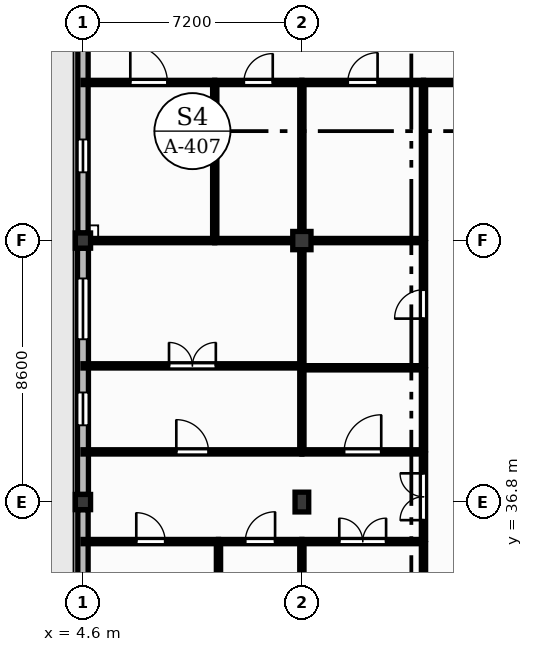
"""IFC4 building model, lengths in metres.
Left out: names, types, materials, properties, quantities, classifications, styles, units other than length and angle.
Written with IfcOpenShell. Run it as: python <this file> out.ifc"""

import sys

from ifc_helpers import new_model, si_unit, direction, frame, frame_2d, origin, origin_2d, place, context, subcontext, project, spatial, rectangle, extrude, element, fill, save


model = new_model("IFC4")
c1 = context("Model", 3, precision=1e-05, world=origin(), true_north=direction((0.0, 1.0)))
c2 = subcontext(c1, "Body", "Model", "MODEL_VIEW")
j1 = project(units=[si_unit("LENGTHUNIT", "METRE"), si_unit("PLANEANGLEUNIT", "RADIAN")], contexts=[c1])
p1 = place(None, origin())
s1 = spatial("IfcSite", under=j1, at=p1, CompositionType="ELEMENT")
p2 = place(p1, origin())
s2 = spatial("IfcBuilding", under=s1, at=p2, CompositionType="ELEMENT")
p3 = place(p2, origin())
s3 = spatial("IfcBuildingStorey", under=s2, at=p3, CompositionType="ELEMENT", Elevation=0.0)
for number, where, z_axis, x_axis in (
    (1, (4.6, 36.8, 0.0), (0.0, 0.0, 1.0), (1.0, 0.0, 0.0)),
    (2, (4.6, 45.4, 0.0), (0.0, 0.0, 1.0), (1.0, 0.0, 0.0)),
):
    element("IfcColumn", number, at=place(p3, frame(where, z_axis=z_axis, x_axis=x_axis)), inside=s3, PredefinedType="COLUMN", context=c2, shape_type="SweptSolid", body=[
        extrude(rectangle(XDim=0.5, YDim=0.5, at=origin_2d()), origin(), (0.0, 0.0, 1.0), 4.2),
    ])
p4 = place(p3, frame((11.8, 36.8, 0.0), z_axis=(0.0, 0.0, 1.0), x_axis=(1.0, 0.0, 0.0)))
e3 = element("IfcColumn", 3, at=p4, inside=s3, PredefinedType="COLUMN", context=c2, shape_type="SweptSolid", body=[
    extrude(rectangle(XDim=0.45, YDim=0.65, at=origin_2d()), origin(), (0.0, 0.0, 1.0), 4.2),
])
p5 = place(p3, frame((11.8, 45.4, 0.0), z_axis=(0.0, 0.0, 1.0), x_axis=(1.0, 0.0, 0.0)))
e4 = element("IfcColumn", 4, at=p5, inside=s3, PredefinedType="COLUMN", context=c2, shape_type="SweptSolid", body=[
    extrude(rectangle(XDim=0.6, YDim=0.6, at=origin_2d()), origin(), (0.0, 0.0, 1.0), 4.2),
])
p6 = place(p3, frame((4.6, 27.5, 0.0), z_axis=(0.0, 0.0, 1.0), x_axis=(0.0, 1.0, 0.0)))
e5 = element("IfcWall", 5, at=p6, inside=s3, PredefinedType="SOLIDWALL", context=c2, shape_type="SweptSolid", body=[
    extrude(rectangle(XDim=9.05, YDim=0.34, at=frame_2d((4.525, 0.0))), origin(), (0.0, 0.0, 1.0), 3.68),
])
p7 = place(p6, frame((2.12, 0.0, 1.0)))
e6 = element("IfcOpeningElement", 6, at=p7, cuts=e5, PredefinedType="OPENING", context=c2, shape_type="SweptSolid", body=[
    extrude(rectangle(XDim=1.6, YDim=2.2, at=frame_2d((0.8, 1.1))), frame((0.0, 0.18, 0.0), z_axis=(0.0, -1.0, 0.0), x_axis=(1.0, 0.0, 0.0)), (0.0, 0.0, 1.0), 0.36),
])
p8 = place(p6, frame((4.4, 0.0, 1.0)))
e7 = element("IfcOpeningElement", 7, at=p8, cuts=e5, PredefinedType="OPENING", context=c2, shape_type="SweptSolid", body=[
    extrude(rectangle(XDim=1.6, YDim=2.2, at=frame_2d((0.8, 1.1))), frame((0.0, 0.18, 0.0), z_axis=(0.0, -1.0, 0.0), x_axis=(1.0, 0.0, 0.0)), (0.0, 0.0, 1.0), 0.36),
])
p9 = place(p3, frame((4.6, 37.05, 0.0), z_axis=(0.0, 0.0, 1.0), x_axis=(0.0, 1.0, 0.0)))
e8 = element("IfcWall", 8, at=p9, inside=s3, PredefinedType="SOLIDWALL", context=c2, shape_type="SweptSolid", body=[
    extrude(rectangle(XDim=8.1, YDim=0.36, at=frame_2d((4.05, 0.0))), origin(), (0.0, 0.0, 1.0), 3.68),
])
p10 = place(p9, frame((2.274, 0.0, 1.0)))
e9 = element("IfcOpeningElement", 9, at=p10, cuts=e8, PredefinedType="OPENING", context=c2, shape_type="SweptSolid", body=[
    extrude(rectangle(XDim=1.08, YDim=1.95, at=frame_2d((0.54, 0.975))), frame((0.0, 0.19, 0.0), z_axis=(0.0, -1.0, 0.0), x_axis=(1.0, 0.0, 0.0)), (0.0, 0.0, 1.0), 0.38),
])
p11 = place(p9, frame((5.104, 0.0, 1.0)))
e10 = element("IfcOpeningElement", 10, at=p11, cuts=e8, PredefinedType="OPENING", context=c2, shape_type="SweptSolid", body=[
    extrude(rectangle(XDim=2.0, YDim=2.2, at=frame_2d((1.0, 1.1))), frame((0.0, 0.19, 0.0), z_axis=(0.0, -1.0, 0.0), x_axis=(1.0, 0.0, 0.0)), (0.0, 0.0, 1.0), 0.38),
])
p12 = place(p3, frame((4.6, 45.65, 0.0), z_axis=(0.0, 0.0, 1.0), x_axis=(0.0, 1.0, 0.0)))
e11 = element("IfcWall", 11, at=p12, inside=s3, PredefinedType="SOLIDWALL", context=c2, shape_type="SweptSolid", body=[
    extrude(rectangle(XDim=6.65, YDim=0.34, at=frame_2d((3.325, 0.0))), origin(), (0.0, 0.0, 1.0), 3.68),
])
p13 = place(p12, frame((1.995, 0.0, 1.0)))
e12 = element("IfcOpeningElement", 12, at=p13, cuts=e11, PredefinedType="OPENING", context=c2, shape_type="SweptSolid", body=[
    extrude(rectangle(XDim=1.08, YDim=1.95, at=frame_2d((0.54, 0.975))), frame((0.0, 0.18, 0.0), z_axis=(0.0, -1.0, 0.0), x_axis=(1.0, 0.0, 0.0)), (0.0, 0.0, 1.0), 0.36),
])
p14 = place(p3, frame((4.6, 35.5, 0.0), z_axis=(0.0, 0.0, 1.0), x_axis=(1.0, 0.0, 0.0)))
e13 = element("IfcWall", 13, at=p14, inside=s3, PredefinedType="PARTITIONING", context=c2, shape_type="SweptSolid", body=[
    extrude(rectangle(XDim=4.457, YDim=0.14, at=frame_2d((2.229, 0.0))), origin(), (0.0, 0.0, 1.0), 4.18),
])
p15 = place(p14, frame((1.753, 0.0, 0.0)))
e14 = element("IfcOpeningElement", 14, at=p15, cuts=e13, PredefinedType="OPENING", context=c2, shape_type="SweptSolid", body=[
    extrude(rectangle(XDim=0.95, YDim=2.1, at=frame_2d((0.475, 1.05))), frame((0.0, 0.08, 0.0), z_axis=(0.0, -1.0, 0.0), x_axis=(1.0, 0.0, 0.0)), (0.0, 0.0, 1.0), 0.16),
])
p16 = place(p3, frame((4.6, 38.45, 0.0), z_axis=(0.0, 0.0, 1.0), x_axis=(1.0, 0.0, 0.0)))
e15 = element("IfcWall", 15, at=p16, inside=s3, PredefinedType="PARTITIONING", context=c2, shape_type="SweptSolid", body=[
    extrude(rectangle(XDim=7.2, YDim=0.14, at=frame_2d((3.6, 0.0))), origin(), (0.0, 0.0, 1.0), 4.18),
])
p17 = place(p16, frame((3.07, 0.0, 0.0)))
e16 = element("IfcOpeningElement", 16, at=p17, cuts=e15, PredefinedType="OPENING", context=c2, shape_type="SweptSolid", body=[
    extrude(rectangle(XDim=1.06, YDim=2.15, at=frame_2d((0.53, 1.075))), frame((0.0, 0.08, 0.0), z_axis=(0.0, -1.0, 0.0), x_axis=(1.0, 0.0, 0.0)), (0.0, 0.0, 1.0), 0.16),
])
p18 = place(p3, frame((4.6, 41.279, 0.0), z_axis=(0.0, 0.0, 1.0), x_axis=(1.0, 0.0, 0.0)))
e17 = element("IfcWall", 17, at=p18, inside=s3, PredefinedType="PARTITIONING", context=c2, shape_type="SweptSolid", body=[
    extrude(rectangle(XDim=7.2, YDim=0.14, at=frame_2d((3.6, 0.0))), origin(), (0.0, 0.0, 1.0), 4.18),
])
p19 = place(p18, frame((2.83, 0.0, 0.0)))
e18 = element("IfcOpeningElement", 18, at=p19, cuts=e17, PredefinedType="OPENING", context=c2, shape_type="SweptSolid", body=[
    extrude(rectangle(XDim=1.54, YDim=2.25, at=frame_2d((0.77, 1.125))), frame((0.0, 0.08, 0.0), z_axis=(0.0, -1.0, 0.0), x_axis=(1.0, 0.0, 0.0)), (0.0, 0.0, 1.0), 0.16),
])
p20 = place(p3, frame((4.85, 45.4, 0.0), z_axis=(0.0, 0.0, 1.0), x_axis=(1.0, 0.0, 0.0)))
e19 = element("IfcWall", 19, at=p20, inside=s3, PredefinedType="PARTITIONING", context=c2, shape_type="SweptSolid", body=[
    extrude(rectangle(XDim=4.084, YDim=0.14, at=frame_2d((2.042, 0.0))), origin(), (0.0, 0.0, 1.0), 3.25),
])
p21 = place(p3, frame((4.6, 50.6, 0.0), z_axis=(0.0, 0.0, 1.0), x_axis=(1.0, 0.0, 0.0)))
e20 = element("IfcWall", 20, at=p21, inside=s3, PredefinedType="PARTITIONING", context=c2, shape_type="SweptSolid", body=[
    extrude(rectangle(XDim=4.334, YDim=0.14, at=frame_2d((2.167, 0.0))), origin(), (0.0, 0.0, 1.0), 4.18),
])
p22 = place(p21, frame((1.557, 0.0, 0.0)))
e21 = element("IfcOpeningElement", 21, at=p22, cuts=e20, PredefinedType="OPENING", context=c2, shape_type="SweptSolid", body=[
    extrude(rectangle(XDim=1.22, YDim=2.1, at=frame_2d((0.61, 1.05))), frame((0.0, 0.08, 0.0), z_axis=(0.0, -1.0, 0.0), x_axis=(1.0, 0.0, 0.0)), (0.0, 0.0, 1.0), 0.16),
])
p23 = place(p3, frame((8.934, 45.47, 0.0), z_axis=(0.0, 0.0, 1.0), x_axis=(0.0, 1.0, 0.0)))
e22 = element("IfcWall", 22, at=p23, inside=s3, PredefinedType="PARTITIONING", context=c2, shape_type="SweptSolid", body=[
    extrude(rectangle(XDim=5.06, YDim=0.14, at=frame_2d((2.53, 0.0))), origin(), (0.0, 0.0, 1.0), 4.18),
])
p24 = place(p3, frame((8.934, 45.4, 0.0), z_axis=(0.0, 0.0, 1.0), x_axis=(1.0, 0.0, 0.0)))
e23 = element("IfcWall", 23, at=p24, inside=s3, PredefinedType="PARTITIONING", context=c2, shape_type="SweptSolid", body=[
    extrude(rectangle(XDim=2.566, YDim=0.14, at=frame_2d((1.283, 0.0))), origin(), (0.0, 0.0, 1.0), 3.25),
])
p25 = place(p3, frame((8.934, 50.6, 0.0), z_axis=(0.0, 0.0, 1.0), x_axis=(1.0, 0.0, 0.0)))
e24 = element("IfcWall", 24, at=p25, inside=s3, PredefinedType="PARTITIONING", context=c2, shape_type="SweptSolid", body=[
    extrude(rectangle(XDim=2.866, YDim=0.14, at=frame_2d((1.433, 0.0))), origin(), (0.0, 0.0, 1.0), 4.18),
])
p26 = place(p25, frame((0.958, 0.0, 0.0)))
e25 = element("IfcOpeningElement", 25, at=p26, cuts=e24, PredefinedType="OPENING", context=c2, shape_type="SweptSolid", body=[
    extrude(rectangle(XDim=0.95, YDim=2.1, at=frame_2d((0.475, 1.05))), frame((0.0, 0.08, 0.0), z_axis=(0.0, -1.0, 0.0), x_axis=(1.0, 0.0, 0.0)), (0.0, 0.0, 1.0), 0.16),
])
p27 = place(p3, frame((9.057, 27.2, 0.0), z_axis=(0.0, 0.0, 1.0), x_axis=(0.0, 1.0, 0.0)))
e26 = element("IfcWall", 26, at=p27, inside=s3, PredefinedType="PARTITIONING", context=c2, shape_type="SweptSolid", body=[
    extrude(rectangle(XDim=8.23, YDim=0.14, at=frame_2d((4.115, 0.0))), origin(), (0.0, 0.0, 1.0), 4.18),
])
p28 = place(p3, frame((9.057, 35.5, 0.0), z_axis=(0.0, 0.0, 1.0), x_axis=(1.0, 0.0, 0.0)))
e27 = element("IfcWall", 27, at=p28, inside=s3, PredefinedType="PARTITIONING", context=c2, shape_type="SweptSolid", body=[
    extrude(rectangle(XDim=2.743, YDim=0.14, at=frame_2d((1.372, 0.0))), origin(), (0.0, 0.0, 1.0), 4.18),
])
p29 = place(p28, frame((0.882, 0.0, 0.0)))
e28 = element("IfcOpeningElement", 28, at=p29, cuts=e27, PredefinedType="OPENING", context=c2, shape_type="SweptSolid", body=[
    extrude(rectangle(XDim=0.98, YDim=2.15, at=frame_2d((0.49, 1.075))), frame((0.0, 0.08, 0.0), z_axis=(0.0, -1.0, 0.0), x_axis=(1.0, 0.0, 0.0)), (0.0, 0.0, 1.0), 0.16),
])
p30 = place(p3, frame((11.8, 30.075, 0.0), z_axis=(0.0, 0.0, 1.0), x_axis=(0.0, 1.0, 0.0)))
e29 = element("IfcWall", 29, at=p30, inside=s3, PredefinedType="PARTITIONING", context=c2, shape_type="SweptSolid", body=[
    extrude(rectangle(XDim=5.355, YDim=0.14, at=frame_2d((2.677, 0.0))), origin(), (0.0, 0.0, 1.0), 3.4),
])
p31 = place(p3, frame((11.8, 35.5, 0.0), z_axis=(0.0, 0.0, 1.0), x_axis=(1.0, 0.0, 0.0)))
e30 = element("IfcWall", 30, at=p31, inside=s3, PredefinedType="PARTITIONING", context=c2, shape_type="SweptSolid", body=[
    extrude(rectangle(XDim=4.0, YDim=0.14, at=frame_2d((2.0, 0.0))), origin(), (0.0, 0.0, 1.0), 4.18),
])
p32 = place(p31, frame((1.23, 0.0, 0.0)))
e31 = element("IfcOpeningElement", 31, at=p32, cuts=e30, PredefinedType="OPENING", context=c2, shape_type="SweptSolid", body=[
    extrude(rectangle(XDim=1.54, YDim=2.25, at=frame_2d((0.77, 1.125))), frame((0.0, 0.08, 0.0), z_axis=(0.0, -1.0, 0.0), x_axis=(1.0, 0.0, 0.0)), (0.0, 0.0, 1.0), 0.16),
])
p33 = place(p3, frame((11.8, 38.52, 0.0), z_axis=(0.0, 0.0, 1.0), x_axis=(0.0, 1.0, 0.0)))
e32 = element("IfcWall", 32, at=p33, inside=s3, PredefinedType="PARTITIONING", context=c2, shape_type="SweptSolid", body=[
    extrude(rectangle(XDim=2.626, YDim=0.14, at=frame_2d((1.313, 0.0))), origin(), (0.0, 0.0, 1.0), 3.5),
])
p34 = place(p3, frame((11.8, 38.45, 0.0), z_axis=(0.0, 0.0, 1.0), x_axis=(1.0, 0.0, 0.0)))
e33 = element("IfcWall", 33, at=p34, inside=s3, PredefinedType="PARTITIONING", context=c2, shape_type="SweptSolid", body=[
    extrude(rectangle(XDim=4.0, YDim=0.14, at=frame_2d((2.0, 0.0))), origin(), (0.0, 0.0, 1.0), 4.18),
])
p35 = place(p34, frame((1.39, 0.0, 0.0)))
e34 = element("IfcOpeningElement", 34, at=p35, cuts=e33, PredefinedType="OPENING", context=c2, shape_type="SweptSolid", body=[
    extrude(rectangle(XDim=1.22, YDim=2.1, at=frame_2d((0.61, 1.05))), frame((0.0, 0.08, 0.0), z_axis=(0.0, -1.0, 0.0), x_axis=(1.0, 0.0, 0.0)), (0.0, 0.0, 1.0), 0.16),
])
p36 = place(p3, frame((11.8, 41.216, 0.0), z_axis=(0.0, 0.0, 1.0), x_axis=(1.0, 0.0, 0.0)))
e35 = element("IfcWall", 35, at=p36, inside=s3, PredefinedType="PARTITIONING", context=c2, shape_type="SweptSolid", body=[
    extrude(rectangle(XDim=4.0, YDim=0.14, at=frame_2d((2.0, 0.0))), origin(), (0.0, 0.0, 1.0), 4.18),
])
p37 = place(p3, frame((11.8, 41.349, 0.0), z_axis=(0.0, 0.0, 1.0), x_axis=(0.0, 1.0, 0.0)))
e36 = element("IfcWall", 36, at=p37, inside=s3, PredefinedType="PARTITIONING", context=c2, shape_type="SweptSolid", body=[
    extrude(rectangle(XDim=3.751, YDim=0.14, at=frame_2d((1.875, 0.0))), origin(), (0.0, 0.0, 1.0), 3.5),
])
p38 = place(p3, frame((11.8, 45.7, 0.0), z_axis=(0.0, 0.0, 1.0), x_axis=(0.0, 1.0, 0.0)))
e37 = element("IfcWall", 37, at=p38, inside=s3, PredefinedType="PARTITIONING", context=c2, shape_type="SweptSolid", body=[
    extrude(rectangle(XDim=4.83, YDim=0.14, at=frame_2d((2.415, 0.0))), origin(), (0.0, 0.0, 1.0), 3.5),
])
p39 = place(p3, frame((12.1, 45.4, 0.0), z_axis=(0.0, 0.0, 1.0), x_axis=(1.0, 0.0, 0.0)))
e38 = element("IfcWall", 38, at=p39, inside=s3, PredefinedType="PARTITIONING", context=c2, shape_type="SweptSolid", body=[
    extrude(rectangle(XDim=3.7, YDim=0.14, at=frame_2d((1.85, 0.0))), origin(), (0.0, 0.0, 1.0), 3.25),
])
p40 = place(p3, frame((11.8, 50.6, 0.0), z_axis=(0.0, 0.0, 1.0), x_axis=(1.0, 0.0, 0.0)))
e39 = element("IfcWall", 39, at=p40, inside=s3, PredefinedType="PARTITIONING", context=c2, shape_type="SweptSolid", body=[
    extrude(rectangle(XDim=4.0, YDim=0.14, at=frame_2d((2.0, 0.0))), origin(), (0.0, 0.0, 1.0), 4.18),
])
p41 = place(p40, frame((1.51, 0.0, 0.0)))
e40 = element("IfcOpeningElement", 40, at=p41, cuts=e39, PredefinedType="OPENING", context=c2, shape_type="SweptSolid", body=[
    extrude(rectangle(XDim=0.98, YDim=2.15, at=frame_2d((0.49, 1.075))), frame((0.0, 0.08, 0.0), z_axis=(0.0, -1.0, 0.0), x_axis=(1.0, 0.0, 0.0)), (0.0, 0.0, 1.0), 0.16),
])
p42 = place(p3, frame((15.8, 30.075, 0.0), z_axis=(0.0, 0.0, 1.0), x_axis=(0.0, 1.0, 0.0)))
e41 = element("IfcWall", 41, at=p42, inside=s3, PredefinedType="PARTITIONING", context=c2, shape_type="SweptSolid", body=[
    extrude(rectangle(XDim=5.355, YDim=0.14, at=frame_2d((2.677, 0.0))), origin(), (0.0, 0.0, 1.0), 4.18),
])
p43 = place(p3, frame((15.8, 35.57, 0.0), z_axis=(0.0, 0.0, 1.0), x_axis=(0.0, 1.0, 0.0)))
e42 = element("IfcWall", 42, at=p43, inside=s3, PredefinedType="PARTITIONING", context=c2, shape_type="SweptSolid", body=[
    extrude(rectangle(XDim=2.81, YDim=0.14, at=frame_2d((1.405, 0.0))), origin(), (0.0, 0.0, 1.0), 4.18),
])
p44 = place(p43, frame((0.635, 0.0, 0.0)))
e43 = element("IfcOpeningElement", 43, at=p44, cuts=e42, PredefinedType="OPENING", context=c2, shape_type="SweptSolid", body=[
    extrude(rectangle(XDim=1.54, YDim=2.25, at=frame_2d((0.77, 1.125))), frame((0.0, 0.08, 0.0), z_axis=(0.0, -1.0, 0.0), x_axis=(1.0, 0.0, 0.0)), (0.0, 0.0, 1.0), 0.16),
])
p45 = place(p3, frame((15.8, 38.52, 0.0), z_axis=(0.0, 0.0, 1.0), x_axis=(0.0, 1.0, 0.0)))
e44 = element("IfcWall", 44, at=p45, inside=s3, PredefinedType="PARTITIONING", context=c2, shape_type="SweptSolid", body=[
    extrude(rectangle(XDim=2.626, YDim=0.14, at=frame_2d((1.313, 0.0))), origin(), (0.0, 0.0, 1.0), 4.18),
])
p46 = place(p3, frame((15.8, 41.286, 0.0), z_axis=(0.0, 0.0, 1.0), x_axis=(0.0, 1.0, 0.0)))
e45 = element("IfcWall", 45, at=p46, inside=s3, PredefinedType="PARTITIONING", context=c2, shape_type="SweptSolid", body=[
    extrude(rectangle(XDim=4.044, YDim=0.14, at=frame_2d((2.022, 0.0))), origin(), (0.0, 0.0, 1.0), 4.18),
])
p47 = place(p46, frame((1.547, 0.0, 0.0)))
e46 = element("IfcOpeningElement", 46, at=p47, cuts=e45, PredefinedType="OPENING", context=c2, shape_type="SweptSolid", body=[
    extrude(rectangle(XDim=0.95, YDim=2.1, at=frame_2d((0.475, 1.05))), frame((0.0, 0.08, 0.0), z_axis=(0.0, -1.0, 0.0), x_axis=(1.0, 0.0, 0.0)), (0.0, 0.0, 1.0), 0.16),
])
p48 = place(p3, frame((15.8, 45.47, 0.0), z_axis=(0.0, 0.0, 1.0), x_axis=(0.0, 1.0, 0.0)))
e47 = element("IfcWall", 47, at=p48, inside=s3, PredefinedType="PARTITIONING", context=c2, shape_type="SweptSolid", body=[
    extrude(rectangle(XDim=5.06, YDim=0.14, at=frame_2d((2.53, 0.0))), origin(), (0.0, 0.0, 1.0), 4.18),
])
p49 = place(p3, frame((15.8, 50.6, 0.0), z_axis=(0.0, 0.0, 1.0), x_axis=(1.0, 0.0, 0.0)))
e48 = element("IfcWall", 48, at=p49, inside=s3, PredefinedType="PARTITIONING", context=c2, shape_type="SweptSolid", body=[
    extrude(rectangle(XDim=3.2, YDim=0.14, at=frame_2d((1.6, 0.0))), origin(), (0.0, 0.0, 1.0), 4.18),
])
p50 = place(p49, frame((1.14, 0.0, 0.0)))
e49 = element("IfcOpeningElement", 49, at=p50, cuts=e48, PredefinedType="OPENING", context=c2, shape_type="SweptSolid", body=[
    extrude(rectangle(XDim=0.92, YDim=2.1, at=frame_2d((0.46, 1.05))), frame((0.0, 0.08, 0.0), z_axis=(0.0, -1.0, 0.0), x_axis=(1.0, 0.0, 0.0)), (0.0, 0.0, 1.0), 0.16),
])
p51 = place(p10, origin())
e50 = element("IfcWindow", 50, at=p51, inside=s3, PartitioningType="SINGLE_PANEL", PredefinedType="WINDOW", context=c2, shape_type="SweptSolid", body=[
    extrude(rectangle(XDim=1.08, YDim=1.95, at=frame_2d((0.54, 0.975))), frame((0.0, 0.03, 0.0), z_axis=(0.0, -1.0, 0.0), x_axis=(1.0, 0.0, 0.0)), (0.0, 0.0, 1.0), 0.06),
])
fill(e9, e50)
p52 = place(p11, origin())
e51 = element("IfcWindow", 51, at=p52, inside=s3, PartitioningType="DOUBLE_PANEL_VERTICAL", PredefinedType="WINDOW", context=c2, shape_type="SweptSolid", body=[
    extrude(rectangle(XDim=2.0, YDim=2.2, at=frame_2d((1.0, 1.1))), frame((0.0, 0.03, 0.0), z_axis=(0.0, -1.0, 0.0), x_axis=(1.0, 0.0, 0.0)), (0.0, 0.0, 1.0), 0.06),
])
fill(e10, e51)
p53 = place(p13, origin())
e52 = element("IfcWindow", 52, at=p53, inside=s3, PartitioningType="SINGLE_PANEL", PredefinedType="WINDOW", context=c2, shape_type="SweptSolid", body=[
    extrude(rectangle(XDim=1.08, YDim=1.95, at=frame_2d((0.54, 0.975))), frame((0.0, 0.03, 0.0), z_axis=(0.0, -1.0, 0.0), x_axis=(1.0, 0.0, 0.0)), (0.0, 0.0, 1.0), 0.06),
])
fill(e12, e52)
p54 = place(p44, origin())
e53 = element("IfcDoor", 53, at=p54, inside=s3, OperationType="DOUBLE_DOOR_SINGLE_SWING", PredefinedType="DOOR", context=c2, shape_type="SweptSolid", body=[
    extrude(rectangle(XDim=1.54, YDim=2.25, at=frame_2d((0.77, 1.125))), frame((0.0, 0.025, 0.0), z_axis=(0.0, -1.0, 0.0), x_axis=(1.0, 0.0, 0.0)), (0.0, 0.0, 1.0), 0.05),
])
fill(e43, e53)
p55 = place(p15, origin())
e54 = element("IfcDoor", 54, at=p55, inside=s3, OperationType="SINGLE_SWING_LEFT", PredefinedType="DOOR", context=c2, shape_type="SweptSolid", body=[
    extrude(rectangle(XDim=0.95, YDim=2.1, at=frame_2d((0.475, 1.05))), frame((0.0, 0.025, 0.0), z_axis=(0.0, -1.0, 0.0), x_axis=(1.0, 0.0, 0.0)), (0.0, 0.0, 1.0), 0.05),
])
fill(e14, e54)
p56 = place(p29, origin())
e55 = element("IfcDoor", 55, at=p56, inside=s3, OperationType="SINGLE_SWING_RIGHT", PredefinedType="DOOR", context=c2, shape_type="SweptSolid", body=[
    extrude(rectangle(XDim=0.98, YDim=2.15, at=frame_2d((0.49, 1.075))), frame((0.0, 0.025, 0.0), z_axis=(0.0, -1.0, 0.0), x_axis=(1.0, 0.0, 0.0)), (0.0, 0.0, 1.0), 0.05),
])
fill(e28, e55)
p57 = place(p17, origin())
e56 = element("IfcDoor", 56, at=p57, inside=s3, OperationType="SINGLE_SWING_LEFT", PredefinedType="DOOR", context=c2, shape_type="SweptSolid", body=[
    extrude(rectangle(XDim=1.06, YDim=2.15, at=frame_2d((0.53, 1.075))), frame((0.0, 0.025, 0.0), z_axis=(0.0, -1.0, 0.0), x_axis=(1.0, 0.0, 0.0)), (0.0, 0.0, 1.0), 0.05),
])
fill(e16, e56)
p58 = place(p19, origin())
e57 = element("IfcDoor", 57, at=p58, inside=s3, OperationType="DOUBLE_DOOR_SINGLE_SWING", PredefinedType="DOOR", context=c2, shape_type="SweptSolid", body=[
    extrude(rectangle(XDim=1.54, YDim=2.25, at=frame_2d((0.77, 1.125))), frame((0.0, 0.025, 0.0), z_axis=(0.0, -1.0, 0.0), x_axis=(1.0, 0.0, 0.0)), (0.0, 0.0, 1.0), 0.05),
])
fill(e18, e57)
p59 = place(p22, origin())
e58 = element("IfcDoor", 58, at=p59, inside=s3, OperationType="SINGLE_SWING_LEFT", PredefinedType="DOOR", context=c2, shape_type="SweptSolid", body=[
    extrude(rectangle(XDim=1.22, YDim=2.1, at=frame_2d((0.61, 1.05))), frame((0.0, 0.025, 0.0), z_axis=(0.0, -1.0, 0.0), x_axis=(1.0, 0.0, 0.0)), (0.0, 0.0, 1.0), 0.05),
])
fill(e21, e58)
p60 = place(p26, origin())
e59 = element("IfcDoor", 59, at=p60, inside=s3, OperationType="SINGLE_SWING_RIGHT", PredefinedType="DOOR", context=c2, shape_type="SweptSolid", body=[
    extrude(rectangle(XDim=0.95, YDim=2.1, at=frame_2d((0.475, 1.05))), frame((0.0, 0.025, 0.0), z_axis=(0.0, -1.0, 0.0), x_axis=(1.0, 0.0, 0.0)), (0.0, 0.0, 1.0), 0.05),
])
fill(e25, e59)
p61 = place(p32, origin())
e60 = element("IfcDoor", 60, at=p61, inside=s3, OperationType="DOUBLE_DOOR_SINGLE_SWING", PredefinedType="DOOR", context=c2, shape_type="SweptSolid", body=[
    extrude(rectangle(XDim=1.54, YDim=2.25, at=frame_2d((0.77, 1.125))), frame((0.0, 0.025, 0.0), z_axis=(0.0, -1.0, 0.0), x_axis=(1.0, 0.0, 0.0)), (0.0, 0.0, 1.0), 0.05),
])
fill(e31, e60)
p62 = place(p35, origin())
e61 = element("IfcDoor", 61, at=p62, inside=s3, OperationType="SINGLE_SWING_RIGHT", PredefinedType="DOOR", context=c2, shape_type="SweptSolid", body=[
    extrude(rectangle(XDim=1.22, YDim=2.1, at=frame_2d((0.61, 1.05))), frame((0.0, 0.025, 0.0), z_axis=(0.0, -1.0, 0.0), x_axis=(1.0, 0.0, 0.0)), (0.0, 0.0, 1.0), 0.05),
])
fill(e34, e61)
p63 = place(p47, origin())
e62 = element("IfcDoor", 62, at=p63, inside=s3, OperationType="SINGLE_SWING_LEFT", PredefinedType="DOOR", context=c2, shape_type="SweptSolid", body=[
    extrude(rectangle(XDim=0.95, YDim=2.1, at=frame_2d((0.475, 1.05))), frame((0.0, 0.025, 0.0), z_axis=(0.0, -1.0, 0.0), x_axis=(1.0, 0.0, 0.0)), (0.0, 0.0, 1.0), 0.05),
])
fill(e46, e62)
p64 = place(p41, origin())
e63 = element("IfcDoor", 63, at=p64, inside=s3, OperationType="SINGLE_SWING_RIGHT", PredefinedType="DOOR", context=c2, shape_type="SweptSolid", body=[
    extrude(rectangle(XDim=0.98, YDim=2.15, at=frame_2d((0.49, 1.075))), frame((0.0, 0.025, 0.0), z_axis=(0.0, -1.0, 0.0), x_axis=(1.0, 0.0, 0.0)), (0.0, 0.0, 1.0), 0.05),
])
fill(e40, e63)
save(model, sys.argv[1])
